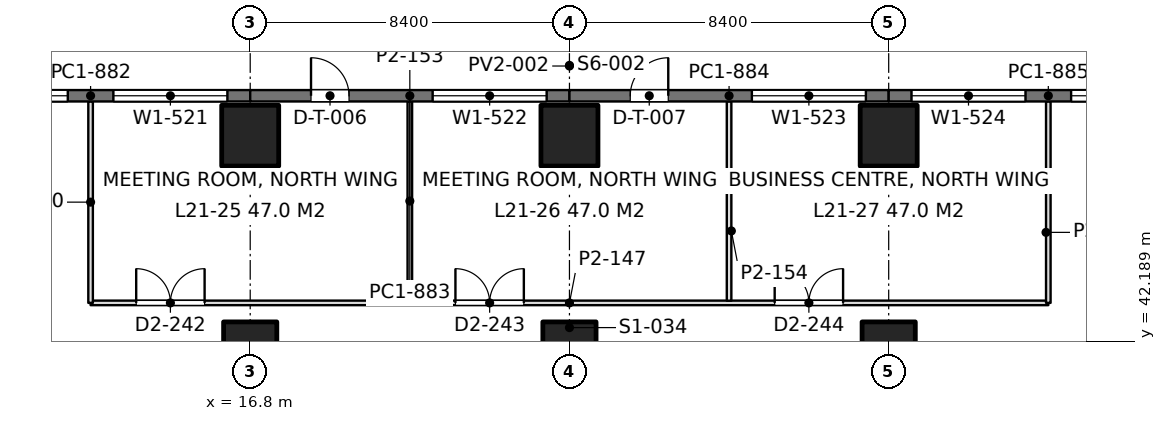
"""IFC4 building model, lengths in metres.
Left out: names, types, materials, properties, quantities, classifications, styles, units other than length and angle.
Written with IfcOpenShell. Run it as: python <this file> out.ifc"""

import sys

from ifc_helpers import new_model, si_unit, direction, frame, frame_2d, origin, origin_2d, place, context, subcontext, project, spatial, rectangle, extrude, element, fill, save


model = new_model("IFC4")
c1 = context("Model", 3, precision=1e-05, world=origin(), true_north=direction((0.0, 1.0)))
c2 = subcontext(c1, "Body", "Model", "MODEL_VIEW")
j1 = project(units=[si_unit("LENGTHUNIT", "METRE"), si_unit("PLANEANGLEUNIT", "RADIAN")], contexts=[c1])
p1 = place(None, origin())
s1 = spatial("IfcSite", under=j1, at=p1, CompositionType="ELEMENT")
p2 = place(p1, origin())
s2 = spatial("IfcBuilding", under=s1, at=p2, CompositionType="ELEMENT")
p3 = place(p2, frame((0.0, 0.0, 96.3)))
s3 = spatial("IfcBuildingStorey", under=s2, at=p3, CompositionType="ELEMENT", Elevation=96.3)
p4 = place(p3, frame((16.8, 42.0, 0.0), z_axis=(0.0, 0.0, 1.0), x_axis=(1.0, 0.0, 0.0)))
e1 = element("IfcColumn", 1, at=p4, inside=s3, PredefinedType="COLUMN", context=c2, shape_type="SweptSolid", body=[
    extrude(rectangle(XDim=1.4, YDim=1.4, at=origin_2d()), origin(), (0.0, 0.0, 1.0), 4.5),
])
p5 = place(p3, frame((16.8, 47.6, -0.36), z_axis=(0.0, 0.0, 1.0), x_axis=(1.0, 0.0, 0.0)))
e2 = element("IfcColumn", 2, at=p5, inside=s3, PredefinedType="COLUMN", context=c2, shape_type="SweptSolid", body=[
    extrude(rectangle(XDim=1.5, YDim=1.6, at=origin_2d()), origin(), (0.0, 0.0, 1.0), 4.86),
])
p6 = place(p3, frame((25.2, 42.0, 0.0), z_axis=(0.0, 0.0, 1.0), x_axis=(1.0, 0.0, 0.0)))
e3 = element("IfcColumn", 3, at=p6, inside=s3, PredefinedType="COLUMN", context=c2, shape_type="SweptSolid", body=[
    extrude(rectangle(XDim=1.4, YDim=1.4, at=origin_2d()), origin(), (0.0, 0.0, 1.0), 4.5),
])
p7 = place(p3, frame((25.2, 47.6, -0.36), z_axis=(0.0, 0.0, 1.0), x_axis=(1.0, 0.0, 0.0)))
e4 = element("IfcColumn", 4, at=p7, inside=s3, PredefinedType="COLUMN", context=c2, shape_type="SweptSolid", body=[
    extrude(rectangle(XDim=1.5, YDim=1.6, at=origin_2d()), origin(), (0.0, 0.0, 1.0), 4.86),
])
p8 = place(p3, frame((33.6, 42.0, 0.0), z_axis=(0.0, 0.0, 1.0), x_axis=(1.0, 0.0, 0.0)))
e5 = element("IfcColumn", 5, at=p8, inside=s3, PredefinedType="COLUMN", context=c2, shape_type="SweptSolid", body=[
    extrude(rectangle(XDim=1.4, YDim=1.4, at=origin_2d()), origin(), (0.0, 0.0, 1.0), 4.5),
])
p9 = place(p3, frame((33.6, 47.6, -0.36), z_axis=(0.0, 0.0, 1.0), x_axis=(1.0, 0.0, 0.0)))
e6 = element("IfcColumn", 6, at=p9, inside=s3, PredefinedType="COLUMN", context=c2, shape_type="SweptSolid", body=[
    extrude(rectangle(XDim=1.5, YDim=1.6, at=origin_2d()), origin(), (0.0, 0.0, 1.0), 4.86),
])
p10 = place(p3, frame((8.4, 48.65, 0.0), z_axis=(0.0, 0.0, 1.0), x_axis=(1.0, 0.0, 0.0)))
e7 = element("IfcWall", 7, at=p10, inside=s3, PredefinedType="SOLIDWALL", context=c2, shape_type="SweptSolid", body=[
    extrude(rectangle(XDim=8.4, YDim=0.3, at=frame_2d((4.2, 0.0))), origin(), (0.0, 0.0, 1.0), 4.35),
])
p11 = place(p10, frame((0.6, 0.0, 0.9)))
e8 = element("IfcOpeningElement", 8, at=p11, cuts=e7, PredefinedType="OPENING", context=c2, shape_type="SweptSolid", body=[
    extrude(rectangle(XDim=3.0, YDim=1.9, at=frame_2d((1.5, 0.95))), frame((0.0, 0.16, 0.0), z_axis=(0.0, -1.0, 0.0), x_axis=(1.0, 0.0, 0.0)), (0.0, 0.0, 1.0), 0.32),
])
p12 = place(p10, frame((4.8, 0.0, 0.9)))
e9 = element("IfcOpeningElement", 9, at=p12, cuts=e7, PredefinedType="OPENING", context=c2, shape_type="SweptSolid", body=[
    extrude(rectangle(XDim=3.0, YDim=1.9, at=frame_2d((1.5, 0.95))), frame((0.0, 0.16, 0.0), z_axis=(0.0, -1.0, 0.0), x_axis=(1.0, 0.0, 0.0)), (0.0, 0.0, 1.0), 0.32),
])
p13 = place(p3, frame((16.8, 48.65, 0.0), z_axis=(0.0, 0.0, 1.0), x_axis=(1.0, 0.0, 0.0)))
e10 = element("IfcWall", 10, at=p13, inside=s3, PredefinedType="SOLIDWALL", context=c2, shape_type="SweptSolid", body=[
    extrude(rectangle(XDim=8.4, YDim=0.3, at=frame_2d((4.2, 0.0))), origin(), (0.0, 0.0, 1.0), 4.35),
])
p14 = place(p13, frame((4.8, 0.0, 0.9)))
e11 = element("IfcOpeningElement", 11, at=p14, cuts=e10, PredefinedType="OPENING", context=c2, shape_type="SweptSolid", body=[
    extrude(rectangle(XDim=3.0, YDim=1.9, at=frame_2d((1.5, 0.95))), frame((0.0, 0.16, 0.0), z_axis=(0.0, -1.0, 0.0), x_axis=(1.0, 0.0, 0.0)), (0.0, 0.0, 1.0), 0.32),
])
p15 = place(p13, frame((1.6, 0.0, 0.0)))
e12 = element("IfcOpeningElement", 12, at=p15, cuts=e10, PredefinedType="OPENING", context=c2, shape_type="SweptSolid", body=[
    extrude(rectangle(XDim=1.0, YDim=2.4, at=frame_2d((0.5, 1.2))), frame((0.0, 0.16, 0.0), z_axis=(0.0, -1.0, 0.0), x_axis=(1.0, 0.0, 0.0)), (0.0, 0.0, 1.0), 0.32),
])
p16 = place(p3, frame((25.2, 48.65, 0.0), z_axis=(0.0, 0.0, 1.0), x_axis=(1.0, 0.0, 0.0)))
e13 = element("IfcWall", 13, at=p16, inside=s3, PredefinedType="SOLIDWALL", context=c2, shape_type="SweptSolid", body=[
    extrude(rectangle(XDim=8.4, YDim=0.3, at=frame_2d((4.2, 0.0))), origin(), (0.0, 0.0, 1.0), 4.35),
])
p17 = place(p16, frame((4.8, 0.0, 0.9)))
e14 = element("IfcOpeningElement", 14, at=p17, cuts=e13, PredefinedType="OPENING", context=c2, shape_type="SweptSolid", body=[
    extrude(rectangle(XDim=3.0, YDim=1.9, at=frame_2d((1.5, 0.95))), frame((0.0, 0.16, 0.0), z_axis=(0.0, -1.0, 0.0), x_axis=(1.0, 0.0, 0.0)), (0.0, 0.0, 1.0), 0.32),
])
p18 = place(p16, frame((1.6, 0.0, 0.0)))
e15 = element("IfcOpeningElement", 15, at=p18, cuts=e13, PredefinedType="OPENING", context=c2, shape_type="SweptSolid", body=[
    extrude(rectangle(XDim=1.0, YDim=2.4, at=frame_2d((0.5, 1.2))), frame((0.0, 0.16, 0.0), z_axis=(0.0, -1.0, 0.0), x_axis=(1.0, 0.0, 0.0)), (0.0, 0.0, 1.0), 0.32),
])
p19 = place(p3, frame((33.6, 48.65, 0.0), z_axis=(0.0, 0.0, 1.0), x_axis=(1.0, 0.0, 0.0)))
e16 = element("IfcWall", 16, at=p19, inside=s3, PredefinedType="SOLIDWALL", context=c2, shape_type="SweptSolid", body=[
    extrude(rectangle(XDim=8.4, YDim=0.3, at=frame_2d((4.2, 0.0))), origin(), (0.0, 0.0, 1.0), 4.35),
])
p20 = place(p19, frame((0.6, 0.0, 0.9)))
e17 = element("IfcOpeningElement", 17, at=p20, cuts=e16, PredefinedType="OPENING", context=c2, shape_type="SweptSolid", body=[
    extrude(rectangle(XDim=3.0, YDim=1.9, at=frame_2d((1.5, 0.95))), frame((0.0, 0.16, 0.0), z_axis=(0.0, -1.0, 0.0), x_axis=(1.0, 0.0, 0.0)), (0.0, 0.0, 1.0), 0.32),
])
p21 = place(p19, frame((4.8, 0.0, 0.9)))
e18 = element("IfcOpeningElement", 18, at=p21, cuts=e16, PredefinedType="OPENING", context=c2, shape_type="SweptSolid", body=[
    extrude(rectangle(XDim=3.0, YDim=1.9, at=frame_2d((1.5, 0.95))), frame((0.0, 0.16, 0.0), z_axis=(0.0, -1.0, 0.0), x_axis=(1.0, 0.0, 0.0)), (0.0, 0.0, 1.0), 0.32),
])
p22 = place(p3, frame((12.6, 43.2, 0.0), z_axis=(0.0, 0.0, 1.0), x_axis=(1.0, 0.0, 0.0)))
e19 = element("IfcWall", 19, at=p22, inside=s3, PredefinedType="PARTITIONING", context=c2, shape_type="SweptSolid", body=[
    extrude(rectangle(XDim=25.2, YDim=0.12, at=frame_2d((12.6, 0.0))), origin(), (0.0, 0.0, 1.0), 3.85),
])
p23 = place(p22, frame((1.2, 0.0, 0.0)))
e20 = element("IfcOpeningElement", 20, at=p23, cuts=e19, PredefinedType="OPENING", context=c2, shape_type="SweptSolid", body=[
    extrude(rectangle(XDim=1.8, YDim=2.2, at=frame_2d((0.9, 1.1))), frame((0.0, 0.07, 0.0), z_axis=(0.0, -1.0, 0.0), x_axis=(1.0, 0.0, 0.0)), (0.0, 0.0, 1.0), 0.14),
])
p24 = place(p22, frame((9.6, 0.0, 0.0)))
e21 = element("IfcOpeningElement", 21, at=p24, cuts=e19, PredefinedType="OPENING", context=c2, shape_type="SweptSolid", body=[
    extrude(rectangle(XDim=1.8, YDim=2.2, at=frame_2d((0.9, 1.1))), frame((0.0, 0.07, 0.0), z_axis=(0.0, -1.0, 0.0), x_axis=(1.0, 0.0, 0.0)), (0.0, 0.0, 1.0), 0.14),
])
p25 = place(p22, frame((18.0, 0.0, 0.0)))
e22 = element("IfcOpeningElement", 22, at=p25, cuts=e19, PredefinedType="OPENING", context=c2, shape_type="SweptSolid", body=[
    extrude(rectangle(XDim=1.8, YDim=2.2, at=frame_2d((0.9, 1.1))), frame((0.0, 0.07, 0.0), z_axis=(0.0, -1.0, 0.0), x_axis=(1.0, 0.0, 0.0)), (0.0, 0.0, 1.0), 0.14),
])
p26 = place(p3, frame((12.6, 43.2, 0.0), z_axis=(0.0, 0.0, 1.0), x_axis=(0.0, 1.0, 0.0)))
e23 = element("IfcWall", 23, at=p26, inside=s3, PredefinedType="PARTITIONING", context=c2, shape_type="SweptSolid", body=[
    extrude(rectangle(XDim=5.302, YDim=0.12, at=frame_2d((2.651, 0.0))), origin(), (0.0, 0.0, 1.0), 3.86),
])
for number, where, z_axis, x_axis in (
    (24, (21.0, 43.258, 0.0), (0.0, 0.0, 1.0), (0.0, 1.0, 0.0)),
    (25, (29.4, 43.258, 0.0), (0.0, 0.0, 1.0), (0.0, 1.0, 0.0)),
):
    element("IfcWall", number, at=place(p3, frame(where, z_axis=z_axis, x_axis=x_axis)), inside=s3, PredefinedType="PARTITIONING", context=c2, shape_type="SweptSolid", body=[
        extrude(rectangle(XDim=5.244, YDim=0.12, at=frame_2d((2.622, 0.0))), origin(), (0.0, 0.0, 1.0), 3.86),
    ])
p27 = place(p3, frame((37.8, 43.2, 0.0), z_axis=(0.0, 0.0, 1.0), x_axis=(0.0, 1.0, 0.0)))
e26 = element("IfcWall", 26, at=p27, inside=s3, PredefinedType="PARTITIONING", context=c2, shape_type="SweptSolid", body=[
    extrude(rectangle(XDim=5.302, YDim=0.12, at=frame_2d((2.651, 0.0))), origin(), (0.0, 0.0, 1.0), 3.86),
])
p28 = place(p11, origin())
e27 = element("IfcWindow", 27, at=p28, inside=s3, PartitioningType="SINGLE_PANEL", PredefinedType="WINDOW", context=c2, shape_type="SweptSolid", body=[
    extrude(rectangle(XDim=3.0, YDim=1.9, at=frame_2d((1.5, 0.95))), frame((0.0, 0.03, 0.0), z_axis=(0.0, -1.0, 0.0), x_axis=(1.0, 0.0, 0.0)), (0.0, 0.0, 1.0), 0.06),
])
fill(e8, e27)
p29 = place(p12, origin())
e28 = element("IfcWindow", 28, at=p29, inside=s3, PartitioningType="SINGLE_PANEL", PredefinedType="WINDOW", context=c2, shape_type="SweptSolid", body=[
    extrude(rectangle(XDim=3.0, YDim=1.9, at=frame_2d((1.5, 0.95))), frame((0.0, 0.03, 0.0), z_axis=(0.0, -1.0, 0.0), x_axis=(1.0, 0.0, 0.0)), (0.0, 0.0, 1.0), 0.06),
])
fill(e9, e28)
p30 = place(p14, origin())
e29 = element("IfcWindow", 29, at=p30, inside=s3, PartitioningType="SINGLE_PANEL", PredefinedType="WINDOW", context=c2, shape_type="SweptSolid", body=[
    extrude(rectangle(XDim=3.0, YDim=1.9, at=frame_2d((1.5, 0.95))), frame((0.0, 0.03, 0.0), z_axis=(0.0, -1.0, 0.0), x_axis=(1.0, 0.0, 0.0)), (0.0, 0.0, 1.0), 0.06),
])
fill(e11, e29)
p31 = place(p15, origin())
e30 = element("IfcDoor", 30, at=p31, inside=s3, OperationType="SINGLE_SWING_LEFT", PredefinedType="DOOR", context=c2, shape_type="SweptSolid", body=[
    extrude(rectangle(XDim=1.0, YDim=2.4, at=frame_2d((0.5, 1.2))), frame((0.0, 0.025, 0.0), z_axis=(0.0, -1.0, 0.0), x_axis=(1.0, 0.0, 0.0)), (0.0, 0.0, 1.0), 0.05),
])
fill(e12, e30)
p32 = place(p17, origin())
e31 = element("IfcWindow", 31, at=p32, inside=s3, PartitioningType="SINGLE_PANEL", PredefinedType="WINDOW", context=c2, shape_type="SweptSolid", body=[
    extrude(rectangle(XDim=3.0, YDim=1.9, at=frame_2d((1.5, 0.95))), frame((0.0, 0.03, 0.0), z_axis=(0.0, -1.0, 0.0), x_axis=(1.0, 0.0, 0.0)), (0.0, 0.0, 1.0), 0.06),
])
fill(e14, e31)
p33 = place(p18, origin())
e32 = element("IfcDoor", 32, at=p33, inside=s3, OperationType="SINGLE_SWING_RIGHT", PredefinedType="DOOR", context=c2, shape_type="SweptSolid", body=[
    extrude(rectangle(XDim=1.0, YDim=2.4, at=frame_2d((0.5, 1.2))), frame((0.0, 0.025, 0.0), z_axis=(0.0, -1.0, 0.0), x_axis=(1.0, 0.0, 0.0)), (0.0, 0.0, 1.0), 0.05),
])
fill(e15, e32)
p34 = place(p20, origin())
e33 = element("IfcWindow", 33, at=p34, inside=s3, PartitioningType="SINGLE_PANEL", PredefinedType="WINDOW", context=c2, shape_type="SweptSolid", body=[
    extrude(rectangle(XDim=3.0, YDim=1.9, at=frame_2d((1.5, 0.95))), frame((0.0, 0.03, 0.0), z_axis=(0.0, -1.0, 0.0), x_axis=(1.0, 0.0, 0.0)), (0.0, 0.0, 1.0), 0.06),
])
fill(e17, e33)
p35 = place(p21, origin())
e34 = element("IfcWindow", 34, at=p35, inside=s3, PartitioningType="SINGLE_PANEL", PredefinedType="WINDOW", context=c2, shape_type="SweptSolid", body=[
    extrude(rectangle(XDim=3.0, YDim=1.9, at=frame_2d((1.5, 0.95))), frame((0.0, 0.03, 0.0), z_axis=(0.0, -1.0, 0.0), x_axis=(1.0, 0.0, 0.0)), (0.0, 0.0, 1.0), 0.06),
])
fill(e18, e34)
p36 = place(p23, origin())
e35 = element("IfcDoor", 35, at=p36, inside=s3, OperationType="DOUBLE_DOOR_SINGLE_SWING", PredefinedType="DOOR", context=c2, shape_type="SweptSolid", body=[
    extrude(rectangle(XDim=1.8, YDim=2.2, at=frame_2d((0.9, 1.1))), frame((0.0, 0.025, 0.0), z_axis=(0.0, -1.0, 0.0), x_axis=(1.0, 0.0, 0.0)), (0.0, 0.0, 1.0), 0.05),
])
fill(e20, e35)
p37 = place(p24, origin())
e36 = element("IfcDoor", 36, at=p37, inside=s3, OperationType="DOUBLE_DOOR_SINGLE_SWING", PredefinedType="DOOR", context=c2, shape_type="SweptSolid", body=[
    extrude(rectangle(XDim=1.8, YDim=2.2, at=frame_2d((0.9, 1.1))), frame((0.0, 0.025, 0.0), z_axis=(0.0, -1.0, 0.0), x_axis=(1.0, 0.0, 0.0)), (0.0, 0.0, 1.0), 0.05),
])
fill(e21, e36)
p38 = place(p25, origin())
e37 = element("IfcDoor", 37, at=p38, inside=s3, OperationType="DOUBLE_DOOR_SINGLE_SWING", PredefinedType="DOOR", context=c2, shape_type="SweptSolid", body=[
    extrude(rectangle(XDim=1.8, YDim=2.2, at=frame_2d((0.9, 1.1))), frame((0.0, 0.025, 0.0), z_axis=(0.0, -1.0, 0.0), x_axis=(1.0, 0.0, 0.0)), (0.0, 0.0, 1.0), 0.05),
])
fill(e22, e37)
save(model, sys.argv[1])
